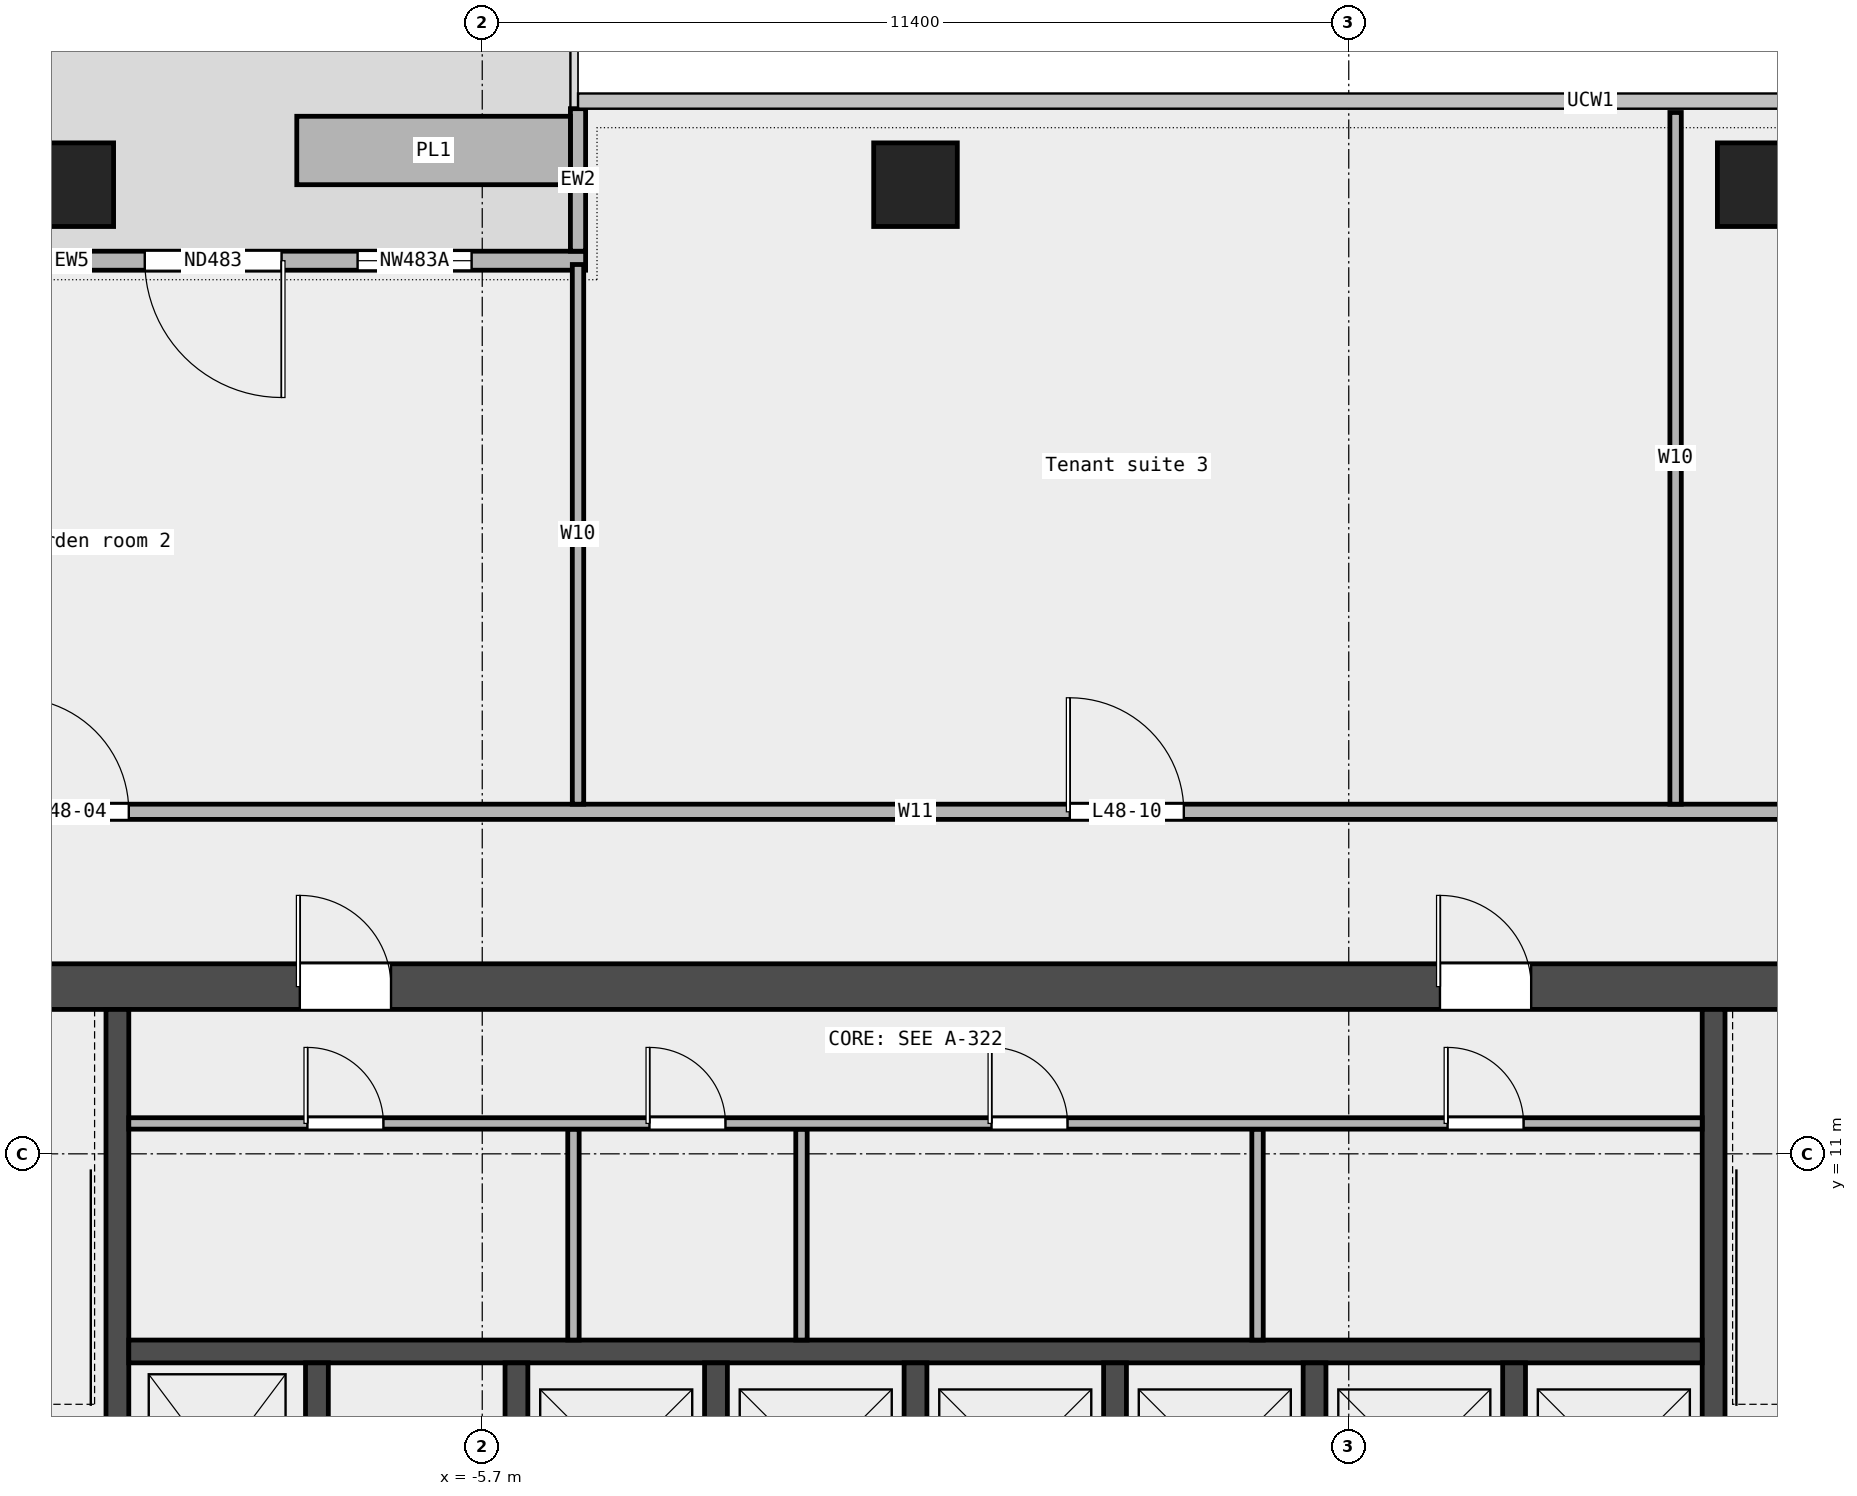
"""IFC4 building model, lengths in metres.
Left out: names, types, materials, properties, quantities, classifications, styles, units other than length and angle.
Written with IfcOpenShell. Run it as: python <this file> out.ifc"""

import sys

from ifc_helpers import new_model, si_unit, direction, frame, frame_2d, origin, origin_2d, place, context, subcontext, project, spatial, rectangle, extrude, element, fill, save


model = new_model("IFC4")
c1 = context("Model", 3, precision=1e-05, world=origin(), true_north=direction((0.0, 1.0)))
c2 = subcontext(c1, "Body", "Model", "MODEL_VIEW")
j1 = project(units=[si_unit("LENGTHUNIT", "METRE"), si_unit("PLANEANGLEUNIT", "RADIAN")], contexts=[c1])
p1 = place(None, origin())
s1 = spatial("IfcSite", under=j1, at=p1, CompositionType="ELEMENT")
p2 = place(p1, origin())
s2 = spatial("IfcBuilding", under=s1, at=p2, CompositionType="ELEMENT")
p3 = place(p2, frame((0.0, 0.0, 227.0)))
s3 = spatial("IfcBuildingStorey", under=s2, at=p3, CompositionType="ELEMENT", Elevation=227.0)
for number, where, z_axis, x_axis in (
    (1, (11.1, 23.75, 0.0), (0.0, 0.0, 1.0), (1.0, 0.0, 0.0)),
    (2, (0.0, 23.75, 0.0), (0.0, 0.0, 1.0), (1.0, 0.0, 0.0)),
    (3, (-11.1, 23.75, 0.0), (0.0, 0.0, 1.0), (1.0, 0.0, 0.0)),
):
    element("IfcColumn", number, at=place(p3, frame(where, z_axis=z_axis, x_axis=x_axis)), inside=s3, PredefinedType="COLUMN", context=c2, shape_type="SweptSolid", body=[
        extrude(rectangle(XDim=1.1, YDim=1.1, at=origin_2d()), origin(), (0.0, 0.0, 1.0), 3.6),
    ])
p4 = place(p3, frame((-4.34, 22.75, 0.0), z_axis=(0.0, 0.0, 1.0), x_axis=(-1.0, 0.0, 0.0)))
e4 = element("IfcWall", 4, at=p4, inside=s3, PredefinedType="STANDARD", context=c2, shape_type="SweptSolid", body=[
    extrude(rectangle(XDim=13.52, YDim=0.25, at=frame_2d((6.76, 0.0))), origin(), (0.0, 0.0, 1.0), 3.6),
])
p5 = place(p4, frame((1.5, 0.0, 0.45)))
e5 = element("IfcOpeningElement", 5, at=p5, cuts=e4, PredefinedType="OPENING", context=c2, shape_type="SweptSolid", body=[
    extrude(rectangle(XDim=1.5, YDim=2.4, at=frame_2d((0.75, 1.2))), frame((0.0, 0.137, 0.0), z_axis=(0.0, -1.0, 0.0), x_axis=(1.0, 0.0, 0.0)), (0.0, 0.0, 1.0), 0.274),
])
p6 = place(p4, frame((4.0, 0.0, 0.0)))
e6 = element("IfcOpeningElement", 6, at=p6, cuts=e4, PredefinedType="OPENING", context=c2, shape_type="SweptSolid", body=[
    extrude(rectangle(XDim=1.8, YDim=2.4, at=frame_2d((0.9, 1.2))), frame((0.0, 0.137, 0.0), z_axis=(0.0, -1.0, 0.0), x_axis=(1.0, 0.0, 0.0)), (0.0, 0.0, 1.0), 0.274),
])
p7 = place(p4, frame((10.5, 0.0, 0.45)))
e7 = element("IfcOpeningElement", 7, at=p7, cuts=e4, PredefinedType="OPENING", context=c2, shape_type="SweptSolid", body=[
    extrude(rectangle(XDim=1.5, YDim=2.4, at=frame_2d((0.75, 1.2))), frame((0.0, 0.137, 0.0), z_axis=(0.0, -1.0, 0.0), x_axis=(1.0, 0.0, 0.0)), (0.0, 0.0, 1.0), 0.274),
])
p8 = place(p3, frame((-4.44, 24.75, 0.0), z_axis=(0.0, 0.0, 1.0), x_axis=(0.0, -1.0, 0.0)))
e8 = element("IfcWall", 8, at=p8, inside=s3, PredefinedType="STANDARD", context=c2, shape_type="SweptSolid", body=[
    extrude(rectangle(XDim=1.875, YDim=0.2, at=frame_2d((0.938, 0.0))), origin(), (0.0, 0.0, 1.0), 3.6),
])
p9 = place(p3, frame((-4.54, 24.2, 0.0), z_axis=(0.0, 0.0, 1.0), x_axis=(-1.0, 0.0, 0.0)))
e9 = element("IfcWall", 9, at=p9, inside=s3, PredefinedType="STANDARD", context=c2, shape_type="SweptSolid", body=[
    extrude(rectangle(XDim=3.6, YDim=0.9, at=frame_2d((1.8, 0.0))), origin(), (0.0, 0.0, 1.0), 0.7),
])
p10 = place(p3, frame((-28.15, 15.5, 0.0), z_axis=(0.0, 0.0, 1.0), x_axis=(1.0, 0.0, 0.0)))
e10 = element("IfcWall", 10, at=p10, inside=s3, PredefinedType="PARTITIONING", context=c2, shape_type="SweptSolid", body=[
    extrude(rectangle(XDim=56.3, YDim=0.2, at=frame_2d((28.15, 0.0))), origin(), (0.0, 0.0, 1.0), 3.6),
])
p11 = place(p10, frame((16.3, 0.0, 0.0)))
e11 = element("IfcOpeningElement", 11, at=p11, cuts=e10, PredefinedType="OPENING", context=c2, shape_type="SweptSolid", body=[
    extrude(rectangle(XDim=1.5, YDim=2.1, at=frame_2d((0.75, 1.05))), frame((0.0, 0.112, 0.0), z_axis=(0.0, -1.0, 0.0), x_axis=(1.0, 0.0, 0.0)), (0.0, 0.0, 1.0), 0.224),
])
p12 = place(p10, frame((46.225, 0.0, 0.0)))
e12 = element("IfcOpeningElement", 12, at=p12, cuts=e10, PredefinedType="OPENING", context=c2, shape_type="SweptSolid", body=[
    extrude(rectangle(XDim=1.8, YDim=2.1, at=frame_2d((0.9, 1.05))), frame((0.0, 0.112, 0.0), z_axis=(0.0, -1.0, 0.0), x_axis=(1.0, 0.0, 0.0)), (0.0, 0.0, 1.0), 0.224),
])
p13 = place(p10, frame((30.18, 0.0, 0.0)))
e13 = element("IfcOpeningElement", 13, at=p13, cuts=e10, PredefinedType="OPENING", context=c2, shape_type="SweptSolid", body=[
    extrude(rectangle(XDim=1.5, YDim=2.1, at=frame_2d((0.75, 1.05))), frame((0.0, 0.112, 0.0), z_axis=(0.0, -1.0, 0.0), x_axis=(1.0, 0.0, 0.0)), (0.0, 0.0, 1.0), 0.224),
])
p14 = place(p10, frame((4.695, 0.0, 0.0)))
e14 = element("IfcOpeningElement", 14, at=p14, cuts=e10, PredefinedType="OPENING", context=c2, shape_type="SweptSolid", body=[
    extrude(rectangle(XDim=1.2, YDim=2.1, at=frame_2d((0.6, 1.05))), frame((0.0, 0.112, 0.0), z_axis=(0.0, -1.0, 0.0), x_axis=(1.0, 0.0, 0.0)), (0.0, 0.0, 1.0), 0.224),
])
p15 = place(p3, frame((-4.44, 15.6, 0.0), z_axis=(0.0, 0.0, 1.0), x_axis=(0.0, 1.0, 0.0)))
e15 = element("IfcWall", 15, at=p15, inside=s3, PredefinedType="PARTITIONING", context=c2, shape_type="SweptSolid", body=[
    extrude(rectangle(XDim=7.1, YDim=0.15, at=frame_2d((3.55, 0.0))), origin(), (0.0, 0.0, 1.0), 3.6),
])
p16 = place(p3, frame((10.0, 15.6, 0.0), z_axis=(0.0, 0.0, 1.0), x_axis=(0.0, 1.0, 0.0)))
e16 = element("IfcWall", 16, at=p16, inside=s3, PredefinedType="PARTITIONING", context=c2, shape_type="SweptSolid", body=[
    extrude(rectangle(XDim=9.1, YDim=0.15, at=frame_2d((4.55, 0.0))), origin(), (0.0, 0.0, 1.0), 3.6),
])
p17 = place(p3, frame((-14.4, 13.2, 0.0), z_axis=(0.0, 0.0, 1.0), x_axis=(1.0, 0.0, 0.0)))
e17 = element("IfcWall", 17, at=p17, inside=s3, PredefinedType="SHEAR", context=c2, shape_type="SweptSolid", body=[
    extrude(rectangle(XDim=28.8, YDim=0.6, at=frame_2d((14.4, 0.0))), origin(), (0.0, 0.0, 1.0), 3.7),
])
p18 = place(p17, frame((6.3, 0.0, 0.0)))
e18 = element("IfcOpeningElement", 18, at=p18, cuts=e17, PredefinedType="OPENING", context=c2, shape_type="SweptSolid", body=[
    extrude(rectangle(XDim=1.2, YDim=2.1, at=frame_2d((0.6, 1.05))), frame((0.0, 0.312, 0.0), z_axis=(0.0, -1.0, 0.0), x_axis=(1.0, 0.0, 0.0)), (0.0, 0.0, 1.0), 0.624),
])
p19 = place(p17, frame((21.3, 0.0, 0.0)))
e19 = element("IfcOpeningElement", 19, at=p19, cuts=e17, PredefinedType="OPENING", context=c2, shape_type="SweptSolid", body=[
    extrude(rectangle(XDim=1.2, YDim=2.1, at=frame_2d((0.6, 1.05))), frame((0.0, 0.312, 0.0), z_axis=(0.0, -1.0, 0.0), x_axis=(1.0, 0.0, 0.0)), (0.0, 0.0, 1.0), 0.624),
])
for number, where, z_axis, x_axis in (
    (20, (-10.5, 5.25, 0.0), (0.0, 0.0, 1.0), (0.0, 1.0, 0.0)),
    (21, (10.5, 5.25, 0.0), (0.0, 0.0, 1.0), (0.0, 1.0, 0.0)),
):
    element("IfcWall", number, at=place(p3, frame(where, z_axis=z_axis, x_axis=x_axis)), inside=s3, PredefinedType="SHEAR", context=c2, shape_type="SweptSolid", body=[
        extrude(rectangle(XDim=7.65, YDim=0.3, at=frame_2d((3.825, 0.0))), origin(), (0.0, 0.0, 1.0), 3.7),
    ])
p20 = place(p3, frame((-10.35, 8.4, 0.0), z_axis=(0.0, 0.0, 1.0), x_axis=(1.0, 0.0, 0.0)))
e22 = element("IfcWall", 22, at=p20, inside=s3, PredefinedType="SOLIDWALL", context=c2, shape_type="SweptSolid", body=[
    extrude(rectangle(XDim=20.7, YDim=0.3, at=frame_2d((10.35, 0.0))), origin(), (0.0, 0.0, 1.0), 3.7),
])
for number, where, z_axis, x_axis in (
    (23, (-7.875, 5.55, 0.0), (0.0, 0.0, 1.0), (0.0, 1.0, 0.0)),
    (24, (-5.25, 5.55, 0.0), (0.0, 0.0, 1.0), (0.0, 1.0, 0.0)),
    (25, (-2.625, 5.55, 0.0), (0.0, 0.0, 1.0), (0.0, 1.0, 0.0)),
    (26, (0.0, 5.55, 0.0), (0.0, 0.0, 1.0), (0.0, 1.0, 0.0)),
    (27, (2.625, 5.55, 0.0), (0.0, 0.0, 1.0), (0.0, 1.0, 0.0)),
    (28, (5.25, 5.55, 0.0), (0.0, 0.0, 1.0), (0.0, 1.0, 0.0)),
    (29, (7.875, 5.55, 0.0), (0.0, 0.0, 1.0), (0.0, 1.0, 0.0)),
):
    element("IfcWall", number, at=place(p3, frame(where, z_axis=z_axis, x_axis=x_axis)), inside=s3, PredefinedType="SOLIDWALL", context=c2, shape_type="SweptSolid", body=[
        extrude(rectangle(XDim=2.7, YDim=0.3, at=frame_2d((1.35, 0.0))), origin(), (0.0, 0.0, 1.0), 3.7),
    ])
for number, where, z_axis, x_axis in (
    (30, (-4.5, 8.55, 0.0), (0.0, 0.0, 1.0), (0.0, 1.0, 0.0)),
    (31, (-1.5, 8.55, 0.0), (0.0, 0.0, 1.0), (0.0, 1.0, 0.0)),
    (32, (4.5, 8.55, 0.0), (0.0, 0.0, 1.0), (0.0, 1.0, 0.0)),
):
    element("IfcWall", number, at=place(p3, frame(where, z_axis=z_axis, x_axis=x_axis)), inside=s3, PredefinedType="PARTITIONING", context=c2, shape_type="SweptSolid", body=[
        extrude(rectangle(XDim=2.775, YDim=0.15, at=frame_2d((1.387, 0.0))), origin(), (0.0, 0.0, 1.0), 3.7),
    ])
p21 = place(p3, frame((-10.35, 11.4, 0.0), z_axis=(0.0, 0.0, 1.0), x_axis=(1.0, 0.0, 0.0)))
e33 = element("IfcWall", 33, at=p21, inside=s3, PredefinedType="PARTITIONING", context=c2, shape_type="SweptSolid", body=[
    extrude(rectangle(XDim=20.7, YDim=0.15, at=frame_2d((10.35, 0.0))), origin(), (0.0, 0.0, 1.0), 3.7),
])
p22 = place(p21, frame((2.35, 0.0, 0.0)))
e34 = element("IfcOpeningElement", 34, at=p22, cuts=e33, PredefinedType="OPENING", context=c2, shape_type="SweptSolid", body=[
    extrude(rectangle(XDim=1.0, YDim=2.1, at=frame_2d((0.5, 1.05))), frame((0.0, 0.087, 0.0), z_axis=(0.0, -1.0, 0.0), x_axis=(1.0, 0.0, 0.0)), (0.0, 0.0, 1.0), 0.174),
])
p23 = place(p21, frame((6.85, 0.0, 0.0)))
e35 = element("IfcOpeningElement", 35, at=p23, cuts=e33, PredefinedType="OPENING", context=c2, shape_type="SweptSolid", body=[
    extrude(rectangle(XDim=1.0, YDim=2.1, at=frame_2d((0.5, 1.05))), frame((0.0, 0.087, 0.0), z_axis=(0.0, -1.0, 0.0), x_axis=(1.0, 0.0, 0.0)), (0.0, 0.0, 1.0), 0.174),
])
p24 = place(p21, frame((11.35, 0.0, 0.0)))
e36 = element("IfcOpeningElement", 36, at=p24, cuts=e33, PredefinedType="OPENING", context=c2, shape_type="SweptSolid", body=[
    extrude(rectangle(XDim=1.0, YDim=2.1, at=frame_2d((0.5, 1.05))), frame((0.0, 0.087, 0.0), z_axis=(0.0, -1.0, 0.0), x_axis=(1.0, 0.0, 0.0)), (0.0, 0.0, 1.0), 0.174),
])
p25 = place(p21, frame((17.35, 0.0, 0.0)))
e37 = element("IfcOpeningElement", 37, at=p25, cuts=e33, PredefinedType="OPENING", context=c2, shape_type="SweptSolid", body=[
    extrude(rectangle(XDim=1.0, YDim=2.1, at=frame_2d((0.5, 1.05))), frame((0.0, 0.087, 0.0), z_axis=(0.0, -1.0, 0.0), x_axis=(1.0, 0.0, 0.0)), (0.0, 0.0, 1.0), 0.174),
])
p26 = place(p5, origin())
e38 = element("IfcWindow", 38, at=p26, inside=s3, PartitioningType="SINGLE_PANEL", PredefinedType="WINDOW", context=c2, shape_type="SweptSolid", body=[
    extrude(rectangle(XDim=1.5, YDim=2.4, at=frame_2d((0.75, 1.2))), frame((0.0, 0.03, 0.0), z_axis=(0.0, -1.0, 0.0), x_axis=(1.0, 0.0, 0.0)), (0.0, 0.0, 1.0), 0.06),
])
fill(e5, e38)
p27 = place(p6, origin())
e39 = element("IfcDoor", 39, at=p27, inside=s3, OperationType="DOUBLE_DOOR_SINGLE_SWING", PredefinedType="DOOR", context=c2, shape_type="SweptSolid", body=[
    extrude(rectangle(XDim=1.8, YDim=2.4, at=frame_2d((0.9, 1.2))), frame((0.0, 0.025, 0.0), z_axis=(0.0, -1.0, 0.0), x_axis=(1.0, 0.0, 0.0)), (0.0, 0.0, 1.0), 0.05),
])
fill(e6, e39)
p28 = place(p11, origin())
e40 = element("IfcDoor", 40, at=p28, inside=s3, OperationType="DOUBLE_DOOR_SINGLE_SWING", PredefinedType="DOOR", context=c2, shape_type="SweptSolid", body=[
    extrude(rectangle(XDim=1.5, YDim=2.1, at=frame_2d((0.75, 1.05))), frame((0.0, 0.025, 0.0), z_axis=(0.0, -1.0, 0.0), x_axis=(1.0, 0.0, 0.0)), (0.0, 0.0, 1.0), 0.05),
])
fill(e11, e40)
p29 = place(p13, origin())
e41 = element("IfcDoor", 41, at=p29, inside=s3, OperationType="DOUBLE_DOOR_SINGLE_SWING", PredefinedType="DOOR", context=c2, shape_type="SweptSolid", body=[
    extrude(rectangle(XDim=1.5, YDim=2.1, at=frame_2d((0.75, 1.05))), frame((0.0, 0.025, 0.0), z_axis=(0.0, -1.0, 0.0), x_axis=(1.0, 0.0, 0.0)), (0.0, 0.0, 1.0), 0.05),
])
fill(e13, e41)
p30 = place(p22, origin())
e42 = element("IfcDoor", 42, at=p30, inside=s3, OperationType="SINGLE_SWING_LEFT", PredefinedType="DOOR", context=c2, shape_type="SweptSolid", body=[
    extrude(rectangle(XDim=1.0, YDim=2.1, at=frame_2d((0.5, 1.05))), frame((0.0, 0.025, 0.0), z_axis=(0.0, -1.0, 0.0), x_axis=(1.0, 0.0, 0.0)), (0.0, 0.0, 1.0), 0.05),
])
fill(e34, e42)
p31 = place(p23, origin())
e43 = element("IfcDoor", 43, at=p31, inside=s3, OperationType="SINGLE_SWING_LEFT", PredefinedType="DOOR", context=c2, shape_type="SweptSolid", body=[
    extrude(rectangle(XDim=1.0, YDim=2.1, at=frame_2d((0.5, 1.05))), frame((0.0, 0.025, 0.0), z_axis=(0.0, -1.0, 0.0), x_axis=(1.0, 0.0, 0.0)), (0.0, 0.0, 1.0), 0.05),
])
fill(e35, e43)
p32 = place(p24, origin())
e44 = element("IfcDoor", 44, at=p32, inside=s3, OperationType="SINGLE_SWING_LEFT", PredefinedType="DOOR", context=c2, shape_type="SweptSolid", body=[
    extrude(rectangle(XDim=1.0, YDim=2.1, at=frame_2d((0.5, 1.05))), frame((0.0, 0.025, 0.0), z_axis=(0.0, -1.0, 0.0), x_axis=(1.0, 0.0, 0.0)), (0.0, 0.0, 1.0), 0.05),
])
fill(e36, e44)
p33 = place(p25, origin())
e45 = element("IfcDoor", 45, at=p33, inside=s3, OperationType="SINGLE_SWING_LEFT", PredefinedType="DOOR", context=c2, shape_type="SweptSolid", body=[
    extrude(rectangle(XDim=1.0, YDim=2.1, at=frame_2d((0.5, 1.05))), frame((0.0, 0.025, 0.0), z_axis=(0.0, -1.0, 0.0), x_axis=(1.0, 0.0, 0.0)), (0.0, 0.0, 1.0), 0.05),
])
fill(e37, e45)
p34 = place(p18, origin())
e46 = element("IfcDoor", 46, at=p34, inside=s3, OperationType="SINGLE_SWING_LEFT", PredefinedType="DOOR", context=c2, shape_type="SweptSolid", body=[
    extrude(rectangle(XDim=1.2, YDim=2.1, at=frame_2d((0.6, 1.05))), frame((0.0, 0.025, 0.0), z_axis=(0.0, -1.0, 0.0), x_axis=(1.0, 0.0, 0.0)), (0.0, 0.0, 1.0), 0.05),
])
fill(e18, e46)
p35 = place(p19, origin())
e47 = element("IfcDoor", 47, at=p35, inside=s3, OperationType="SINGLE_SWING_RIGHT", PredefinedType="DOOR", context=c2, shape_type="SweptSolid", body=[
    extrude(rectangle(XDim=1.2, YDim=2.1, at=frame_2d((0.6, 1.05))), frame((0.0, 0.025, 0.0), z_axis=(0.0, -1.0, 0.0), x_axis=(1.0, 0.0, 0.0)), (0.0, 0.0, 1.0), 0.05),
])
fill(e19, e47)
save(model, sys.argv[1])
